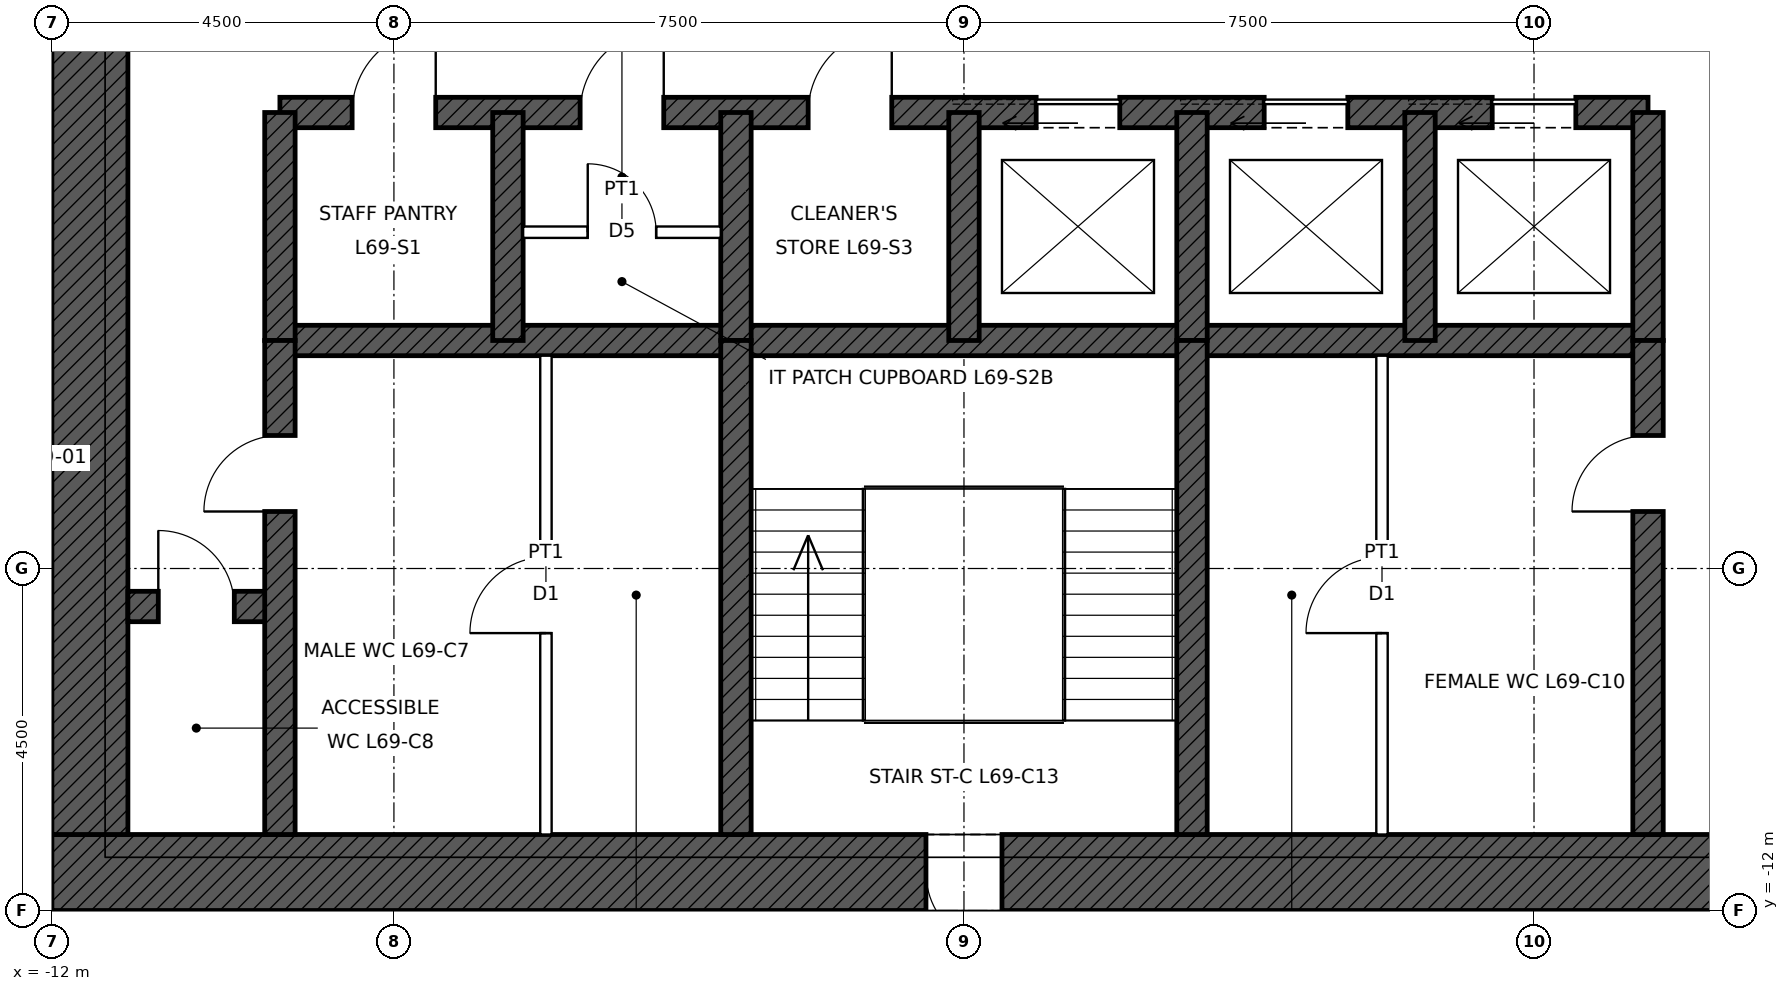
"""IFC4 building model, lengths in metres.
Left out: names, types, materials, properties, quantities, classifications, styles, units other than length and angle.
Written with IfcOpenShell. Run it as: python <this file> out.ifc"""

import sys

from ifc_helpers import new_model, si_unit, direction, frame, frame_2d, origin, place, context, subcontext, project, spatial, rectangle, extrude, element, fill, save


model = new_model("IFC4")
c1 = context("Model", 3, precision=1e-05, world=origin(), true_north=direction((0.0, 1.0)))
c2 = subcontext(c1, "Body", "Model", "MODEL_VIEW")
j1 = project(units=[si_unit("LENGTHUNIT", "METRE"), si_unit("PLANEANGLEUNIT", "RADIAN")], contexts=[c1])
p1 = place(None, origin())
s1 = spatial("IfcSite", under=j1, at=p1, CompositionType="ELEMENT")
p2 = place(p1, origin())
s2 = spatial("IfcBuilding", under=s1, at=p2, CompositionType="ELEMENT")
p3 = place(p2, frame((0.0, 0.0, 311.9)))
s3 = spatial("IfcBuildingStorey", under=s2, at=p3, CompositionType="ELEMENT", Elevation=311.9)
p4 = place(p3, frame((12.0, -11.5, 0.0), z_axis=(0.0, 0.0, 1.0), x_axis=(-1.0, 0.0, 0.0)))
e1 = element("IfcWall", 1, at=p4, inside=s3, PredefinedType="SHEAR", context=c2, shape_type="SweptSolid", body=[
    extrude(rectangle(XDim=24.0, YDim=1.0, at=frame_2d((12.0, 0.0))), origin(), (0.0, 0.0, 1.0), 4.0),
])
p5 = place(p4, frame((11.5, 0.0, 0.0)))
e2 = element("IfcOpeningElement", 2, at=p5, cuts=e1, PredefinedType="OPENING", context=c2, shape_type="SweptSolid", body=[
    extrude(rectangle(XDim=1.0, YDim=2.1, at=frame_2d((0.5, 1.05))), frame((0.0, 0.51, 0.0), z_axis=(0.0, -1.0, 0.0), x_axis=(1.0, 0.0, 0.0)), (0.0, 0.0, 1.0), 1.02),
])
p6 = place(p4, frame((1.0, 0.0, 0.0)))
e3 = element("IfcOpeningElement", 3, at=p6, cuts=e1, PredefinedType="OPENING", context=c2, shape_type="SweptSolid", body=[
    extrude(rectangle(XDim=1.0, YDim=2.4, at=frame_2d((0.5, 1.2))), frame((0.0, 0.51, 0.0), z_axis=(0.0, -1.0, 0.0), x_axis=(1.0, 0.0, 0.0)), (0.0, 0.0, 1.0), 1.02),
])
p7 = place(p3, frame((-11.5, -11.0, 0.0), z_axis=(0.0, 0.0, 1.0), x_axis=(0.0, 1.0, 0.0)))
e4 = element("IfcWall", 4, at=p7, inside=s3, PredefinedType="SHEAR", context=c2, shape_type="SweptSolid", body=[
    extrude(rectangle(XDim=22.0, YDim=1.0, at=frame_2d((11.0, 0.0))), origin(), (0.0, 0.0, 1.0), 4.0),
])
p8 = place(p7, frame((10.5, 0.0, 0.0)))
e5 = element("IfcOpeningElement", 5, at=p8, cuts=e4, PredefinedType="OPENING", context=c2, shape_type="SweptSolid", body=[
    extrude(rectangle(XDim=1.0, YDim=2.4, at=frame_2d((0.5, 1.2))), frame((0.0, 0.51, 0.0), z_axis=(0.0, -1.0, 0.0), x_axis=(1.0, 0.0, 0.0)), (0.0, 0.0, 1.0), 1.02),
])
p9 = place(p3, frame((-9.0, -1.5, 0.0), z_axis=(0.0, 0.0, 1.0), x_axis=(1.0, 0.0, 0.0)))
e6 = element("IfcWall", 6, at=p9, inside=s3, PredefinedType="SHEAR", context=c2, shape_type="SweptSolid", body=[
    extrude(rectangle(XDim=18.0, YDim=0.4, at=frame_2d((9.0, 0.0))), origin(), (0.0, 0.0, 1.0), 4.0),
])
p10 = place(p9, frame((9.95, 0.0, 0.0)))
e7 = element("IfcOpeningElement", 7, at=p10, cuts=e6, PredefinedType="OPENING", context=c2, shape_type="SweptSolid", body=[
    extrude(rectangle(XDim=1.1, YDim=2.1, at=frame_2d((0.55, 1.05))), frame((0.0, 0.21, 0.0), z_axis=(0.0, -1.0, 0.0), x_axis=(1.0, 0.0, 0.0)), (0.0, 0.0, 1.0), 0.42),
])
p11 = place(p9, frame((12.95, 0.0, 0.0)))
e8 = element("IfcOpeningElement", 8, at=p11, cuts=e6, PredefinedType="OPENING", context=c2, shape_type="SweptSolid", body=[
    extrude(rectangle(XDim=1.1, YDim=2.1, at=frame_2d((0.55, 1.05))), frame((0.0, 0.21, 0.0), z_axis=(0.0, -1.0, 0.0), x_axis=(1.0, 0.0, 0.0)), (0.0, 0.0, 1.0), 0.42),
])
p12 = place(p9, frame((15.95, 0.0, 0.0)))
e9 = element("IfcOpeningElement", 9, at=p12, cuts=e6, PredefinedType="OPENING", context=c2, shape_type="SweptSolid", body=[
    extrude(rectangle(XDim=1.1, YDim=2.1, at=frame_2d((0.55, 1.05))), frame((0.0, 0.21, 0.0), z_axis=(0.0, -1.0, 0.0), x_axis=(1.0, 0.0, 0.0)), (0.0, 0.0, 1.0), 0.42),
])
p13 = place(p9, frame((0.95, 0.0, 0.0)))
e10 = element("IfcOpeningElement", 10, at=p13, cuts=e6, PredefinedType="OPENING", context=c2, shape_type="SweptSolid", body=[
    extrude(rectangle(XDim=1.1, YDim=2.1, at=frame_2d((0.55, 1.05))), frame((0.0, 0.21, 0.0), z_axis=(0.0, -1.0, 0.0), x_axis=(1.0, 0.0, 0.0)), (0.0, 0.0, 1.0), 0.42),
])
p14 = place(p9, frame((3.95, 0.0, 0.0)))
e11 = element("IfcOpeningElement", 11, at=p14, cuts=e6, PredefinedType="OPENING", context=c2, shape_type="SweptSolid", body=[
    extrude(rectangle(XDim=1.1, YDim=2.1, at=frame_2d((0.55, 1.05))), frame((0.0, 0.21, 0.0), z_axis=(0.0, -1.0, 0.0), x_axis=(1.0, 0.0, 0.0)), (0.0, 0.0, 1.0), 0.42),
])
p15 = place(p9, frame((6.95, 0.0, 0.0)))
e12 = element("IfcOpeningElement", 12, at=p15, cuts=e6, PredefinedType="OPENING", context=c2, shape_type="SweptSolid", body=[
    extrude(rectangle(XDim=1.1, YDim=2.1, at=frame_2d((0.55, 1.05))), frame((0.0, 0.21, 0.0), z_axis=(0.0, -1.0, 0.0), x_axis=(1.0, 0.0, 0.0)), (0.0, 0.0, 1.0), 0.42),
])
p16 = place(p3, frame((-9.0, -4.5, 0.0), z_axis=(0.0, 0.0, 1.0), x_axis=(1.0, 0.0, 0.0)))
e13 = element("IfcWall", 13, at=p16, inside=s3, PredefinedType="SHEAR", context=c2, shape_type="SweptSolid", body=[
    extrude(rectangle(XDim=18.0, YDim=0.4, at=frame_2d((9.0, 0.0))), origin(), (0.0, 0.0, 1.0), 4.0),
])
p17 = place(p3, frame((-11.0, -8.0, 0.0), z_axis=(0.0, 0.0, 1.0), x_axis=(1.0, 0.0, 0.0)))
e14 = element("IfcWall", 14, at=p17, inside=s3, PredefinedType="SHEAR", context=c2, shape_type="SweptSolid", body=[
    extrude(rectangle(XDim=2.0, YDim=0.4, at=frame_2d((1.0, 0.0))), origin(), (0.0, 0.0, 1.0), 4.0),
])
p18 = place(p17, frame((0.4, 0.0, 0.0)))
e15 = element("IfcOpeningElement", 15, at=p18, cuts=e14, PredefinedType="OPENING", context=c2, shape_type="SweptSolid", body=[
    extrude(rectangle(XDim=1.0, YDim=2.1, at=frame_2d((0.5, 1.05))), frame((0.0, 0.21, 0.0), z_axis=(0.0, -1.0, 0.0), x_axis=(1.0, 0.0, 0.0)), (0.0, 0.0, 1.0), 0.42),
])
for number, where, z_axis, x_axis in (
    (16, (-9.0, -4.5, 0.0), (0.0, 0.0, 1.0), (0.0, 1.0, 0.0)),
    (17, (9.0, -4.5, 0.0), (0.0, 0.0, 1.0), (0.0, 1.0, 0.0)),
    (18, (-6.0, -4.5, 0.0), (0.0, 0.0, 1.0), (0.0, 1.0, 0.0)),
    (19, (-3.0, -4.5, 0.0), (0.0, 0.0, 1.0), (0.0, 1.0, 0.0)),
    (20, (0.0, -4.5, 0.0), (0.0, 0.0, 1.0), (0.0, 1.0, 0.0)),
    (21, (3.0, -4.5, 0.0), (0.0, 0.0, 1.0), (0.0, 1.0, 0.0)),
    (22, (6.0, -4.5, 0.0), (0.0, 0.0, 1.0), (0.0, 1.0, 0.0)),
):
    element("IfcWall", number, at=place(p3, frame(where, z_axis=z_axis, x_axis=x_axis)), inside=s3, PredefinedType="SHEAR", context=c2, shape_type="SweptSolid", body=[
        extrude(rectangle(XDim=3.0, YDim=0.4, at=frame_2d((1.5, 0.0))), origin(), (0.0, 0.0, 1.0), 4.0),
    ])
p19 = place(p3, frame((-9.0, -11.0, 0.0), z_axis=(0.0, 0.0, 1.0), x_axis=(0.0, 1.0, 0.0)))
e23 = element("IfcWall", 23, at=p19, inside=s3, PredefinedType="SHEAR", context=c2, shape_type="SweptSolid", body=[
    extrude(rectangle(XDim=6.5, YDim=0.4, at=frame_2d((3.25, 0.0))), origin(), (0.0, 0.0, 1.0), 4.0),
])
p20 = place(p19, frame((4.25, 0.0, 0.0)))
e24 = element("IfcOpeningElement", 24, at=p20, cuts=e23, PredefinedType="OPENING", context=c2, shape_type="SweptSolid", body=[
    extrude(rectangle(XDim=1.0, YDim=2.1, at=frame_2d((0.5, 1.05))), frame((0.0, 0.21, 0.0), z_axis=(0.0, -1.0, 0.0), x_axis=(1.0, 0.0, 0.0)), (0.0, 0.0, 1.0), 0.42),
])
p21 = place(p3, frame((9.0, -11.0, 0.0), z_axis=(0.0, 0.0, 1.0), x_axis=(0.0, 1.0, 0.0)))
e25 = element("IfcWall", 25, at=p21, inside=s3, PredefinedType="SHEAR", context=c2, shape_type="SweptSolid", body=[
    extrude(rectangle(XDim=6.5, YDim=0.4, at=frame_2d((3.25, 0.0))), origin(), (0.0, 0.0, 1.0), 4.0),
])
p22 = place(p21, frame((4.25, 0.0, 0.0)))
e26 = element("IfcOpeningElement", 26, at=p22, cuts=e25, PredefinedType="OPENING", context=c2, shape_type="SweptSolid", body=[
    extrude(rectangle(XDim=1.0, YDim=2.1, at=frame_2d((0.5, 1.05))), frame((0.0, 0.21, 0.0), z_axis=(0.0, -1.0, 0.0), x_axis=(1.0, 0.0, 0.0)), (0.0, 0.0, 1.0), 0.42),
])
for number, where, z_axis, x_axis in (
    (27, (-3.0, -11.0, 0.0), (0.0, 0.0, 1.0), (0.0, 1.0, 0.0)),
    (28, (3.0, -11.0, 0.0), (0.0, 0.0, 1.0), (0.0, 1.0, 0.0)),
):
    element("IfcWall", number, at=place(p3, frame(where, z_axis=z_axis, x_axis=x_axis)), inside=s3, PredefinedType="SHEAR", context=c2, shape_type="SweptSolid", body=[
        extrude(rectangle(XDim=6.5, YDim=0.4, at=frame_2d((3.25, 0.0))), origin(), (0.0, 0.0, 1.0), 4.0),
    ])
p23 = place(p3, frame((-5.5, -11.0, 0.0), z_axis=(0.0, 0.0, 1.0), x_axis=(0.0, 1.0, 0.0)))
e29 = element("IfcWall", 29, at=p23, inside=s3, PredefinedType="PARTITIONING", context=c2, shape_type="SweptSolid", body=[
    extrude(rectangle(XDim=6.3, YDim=0.15, at=frame_2d((3.15, 0.0))), origin(), (0.0, 0.0, 1.0), 3.75),
])
p24 = place(p23, frame((2.65, 0.0, 0.0)))
e30 = element("IfcOpeningElement", 30, at=p24, cuts=e29, PredefinedType="OPENING", context=c2, shape_type="SweptSolid", body=[
    extrude(rectangle(XDim=1.0, YDim=2.1, at=frame_2d((0.5, 1.05))), frame((0.0, 0.085, 0.0), z_axis=(0.0, -1.0, 0.0), x_axis=(1.0, 0.0, 0.0)), (0.0, 0.0, 1.0), 0.17),
])
p25 = place(p3, frame((5.5, -11.0, 0.0), z_axis=(0.0, 0.0, 1.0), x_axis=(0.0, 1.0, 0.0)))
e31 = element("IfcWall", 31, at=p25, inside=s3, PredefinedType="PARTITIONING", context=c2, shape_type="SweptSolid", body=[
    extrude(rectangle(XDim=6.3, YDim=0.15, at=frame_2d((3.15, 0.0))), origin(), (0.0, 0.0, 1.0), 3.75),
])
p26 = place(p25, frame((2.65, 0.0, 0.0)))
e32 = element("IfcOpeningElement", 32, at=p26, cuts=e31, PredefinedType="OPENING", context=c2, shape_type="SweptSolid", body=[
    extrude(rectangle(XDim=1.0, YDim=2.1, at=frame_2d((0.5, 1.05))), frame((0.0, 0.085, 0.0), z_axis=(0.0, -1.0, 0.0), x_axis=(1.0, 0.0, 0.0)), (0.0, 0.0, 1.0), 0.17),
])
p27 = place(p3, frame((-5.8, -3.075, 0.0), z_axis=(0.0, 0.0, 1.0), x_axis=(1.0, 0.0, 0.0)))
e33 = element("IfcWall", 33, at=p27, inside=s3, PredefinedType="PARTITIONING", context=c2, shape_type="SweptSolid", body=[
    extrude(rectangle(XDim=2.6, YDim=0.15, at=frame_2d((1.3, 0.0))), origin(), (0.0, 0.0, 1.0), 3.75),
])
p28 = place(p27, frame((0.85, 0.0, 0.0)))
e34 = element("IfcOpeningElement", 34, at=p28, cuts=e33, PredefinedType="OPENING", context=c2, shape_type="SweptSolid", body=[
    extrude(rectangle(XDim=0.9, YDim=2.1, at=frame_2d((0.45, 1.05))), frame((0.0, 0.085, 0.0), z_axis=(0.0, -1.0, 0.0), x_axis=(1.0, 0.0, 0.0)), (0.0, 0.0, 1.0), 0.17),
])
p29 = place(p5, origin())
e35 = element("IfcDoor", 35, at=p29, inside=s3, OperationType="SINGLE_SWING_LEFT", PredefinedType="DOOR", context=c2, shape_type="SweptSolid", body=[
    extrude(rectangle(XDim=1.0, YDim=2.1, at=frame_2d((0.5, 1.05))), frame((0.0, 0.485, 0.0), z_axis=(0.0, -1.0, 0.0), x_axis=(1.0, 0.0, 0.0)), (0.0, 0.0, 1.0), 0.05),
])
fill(e2, e35)
p30 = place(p20, origin())
e36 = element("IfcDoor", 36, at=p30, inside=s3, OperationType="SINGLE_SWING_LEFT", PredefinedType="DOOR", context=c2, shape_type="SweptSolid", body=[
    extrude(rectangle(XDim=1.0, YDim=2.1, at=frame_2d((0.5, 1.05))), frame((0.0, 0.025, 0.0), z_axis=(0.0, -1.0, 0.0), x_axis=(1.0, 0.0, 0.0)), (0.0, 0.0, 1.0), 0.05),
])
fill(e24, e36)
p31 = place(p22, origin())
e37 = element("IfcDoor", 37, at=p31, inside=s3, OperationType="SINGLE_SWING_LEFT", PredefinedType="DOOR", context=c2, shape_type="SweptSolid", body=[
    extrude(rectangle(XDim=1.0, YDim=2.1, at=frame_2d((0.5, 1.05))), frame((0.0, 0.025, 0.0), z_axis=(0.0, -1.0, 0.0), x_axis=(1.0, 0.0, 0.0)), (0.0, 0.0, 1.0), 0.05),
])
fill(e26, e37)
p32 = place(p18, origin())
e38 = element("IfcDoor", 38, at=p32, inside=s3, OperationType="SINGLE_SWING_LEFT", PredefinedType="DOOR", context=c2, shape_type="SweptSolid", body=[
    extrude(rectangle(XDim=1.0, YDim=2.1, at=frame_2d((0.5, 1.05))), frame((0.0, 0.025, 0.0), z_axis=(0.0, -1.0, 0.0), x_axis=(1.0, 0.0, 0.0)), (0.0, 0.0, 1.0), 0.05),
])
fill(e15, e38)
p33 = place(p10, origin())
e39 = element("IfcDoor", 39, at=p33, inside=s3, OperationType="SLIDING_TO_LEFT", PredefinedType="DOOR", context=c2, shape_type="SweptSolid", body=[
    extrude(rectangle(XDim=1.1, YDim=2.1, at=frame_2d((0.55, 1.05))), frame((0.0, 0.025, 0.0), z_axis=(0.0, -1.0, 0.0), x_axis=(1.0, 0.0, 0.0)), (0.0, 0.0, 1.0), 0.05),
])
fill(e7, e39)
p34 = place(p11, origin())
e40 = element("IfcDoor", 40, at=p34, inside=s3, OperationType="SLIDING_TO_LEFT", PredefinedType="DOOR", context=c2, shape_type="SweptSolid", body=[
    extrude(rectangle(XDim=1.1, YDim=2.1, at=frame_2d((0.55, 1.05))), frame((0.0, 0.025, 0.0), z_axis=(0.0, -1.0, 0.0), x_axis=(1.0, 0.0, 0.0)), (0.0, 0.0, 1.0), 0.05),
])
fill(e8, e40)
p35 = place(p12, origin())
e41 = element("IfcDoor", 41, at=p35, inside=s3, OperationType="SLIDING_TO_LEFT", PredefinedType="DOOR", context=c2, shape_type="SweptSolid", body=[
    extrude(rectangle(XDim=1.1, YDim=2.1, at=frame_2d((0.55, 1.05))), frame((0.0, 0.025, 0.0), z_axis=(0.0, -1.0, 0.0), x_axis=(1.0, 0.0, 0.0)), (0.0, 0.0, 1.0), 0.05),
])
fill(e9, e41)
p36 = place(p24, origin())
e42 = element("IfcDoor", 42, at=p36, inside=s3, OperationType="SINGLE_SWING_LEFT", PredefinedType="DOOR", context=c2, shape_type="SweptSolid", body=[
    extrude(rectangle(XDim=1.0, YDim=2.1, at=frame_2d((0.5, 1.05))), frame((0.0, 0.025, 0.0), z_axis=(0.0, -1.0, 0.0), x_axis=(1.0, 0.0, 0.0)), (0.0, 0.0, 1.0), 0.05),
])
fill(e30, e42)
p37 = place(p26, origin())
e43 = element("IfcDoor", 43, at=p37, inside=s3, OperationType="SINGLE_SWING_LEFT", PredefinedType="DOOR", context=c2, shape_type="SweptSolid", body=[
    extrude(rectangle(XDim=1.0, YDim=2.1, at=frame_2d((0.5, 1.05))), frame((0.0, 0.025, 0.0), z_axis=(0.0, -1.0, 0.0), x_axis=(1.0, 0.0, 0.0)), (0.0, 0.0, 1.0), 0.05),
])
fill(e32, e43)
p38 = place(p13, origin())
e44 = element("IfcDoor", 44, at=p38, inside=s3, OperationType="SINGLE_SWING_RIGHT", PredefinedType="DOOR", context=c2, shape_type="SweptSolid", body=[
    extrude(rectangle(XDim=1.1, YDim=2.1, at=frame_2d((0.55, 1.05))), frame((0.0, 0.025, 0.0), z_axis=(0.0, -1.0, 0.0), x_axis=(1.0, 0.0, 0.0)), (0.0, 0.0, 1.0), 0.05),
])
fill(e10, e44)
p39 = place(p14, origin())
e45 = element("IfcDoor", 45, at=p39, inside=s3, OperationType="SINGLE_SWING_RIGHT", PredefinedType="DOOR", context=c2, shape_type="SweptSolid", body=[
    extrude(rectangle(XDim=1.1, YDim=2.1, at=frame_2d((0.55, 1.05))), frame((0.0, 0.025, 0.0), z_axis=(0.0, -1.0, 0.0), x_axis=(1.0, 0.0, 0.0)), (0.0, 0.0, 1.0), 0.05),
])
fill(e11, e45)
p40 = place(p28, origin())
e46 = element("IfcDoor", 46, at=p40, inside=s3, OperationType="SINGLE_SWING_LEFT", PredefinedType="DOOR", context=c2, shape_type="SweptSolid", body=[
    extrude(rectangle(XDim=0.9, YDim=2.1, at=frame_2d((0.45, 1.05))), frame((0.0, 0.025, 0.0), z_axis=(0.0, -1.0, 0.0), x_axis=(1.0, 0.0, 0.0)), (0.0, 0.0, 1.0), 0.05),
])
fill(e34, e46)
p41 = place(p15, origin())
e47 = element("IfcDoor", 47, at=p41, inside=s3, OperationType="SINGLE_SWING_RIGHT", PredefinedType="DOOR", context=c2, shape_type="SweptSolid", body=[
    extrude(rectangle(XDim=1.1, YDim=2.1, at=frame_2d((0.55, 1.05))), frame((0.0, 0.025, 0.0), z_axis=(0.0, -1.0, 0.0), x_axis=(1.0, 0.0, 0.0)), (0.0, 0.0, 1.0), 0.05),
])
fill(e12, e47)
save(model, sys.argv[1])
